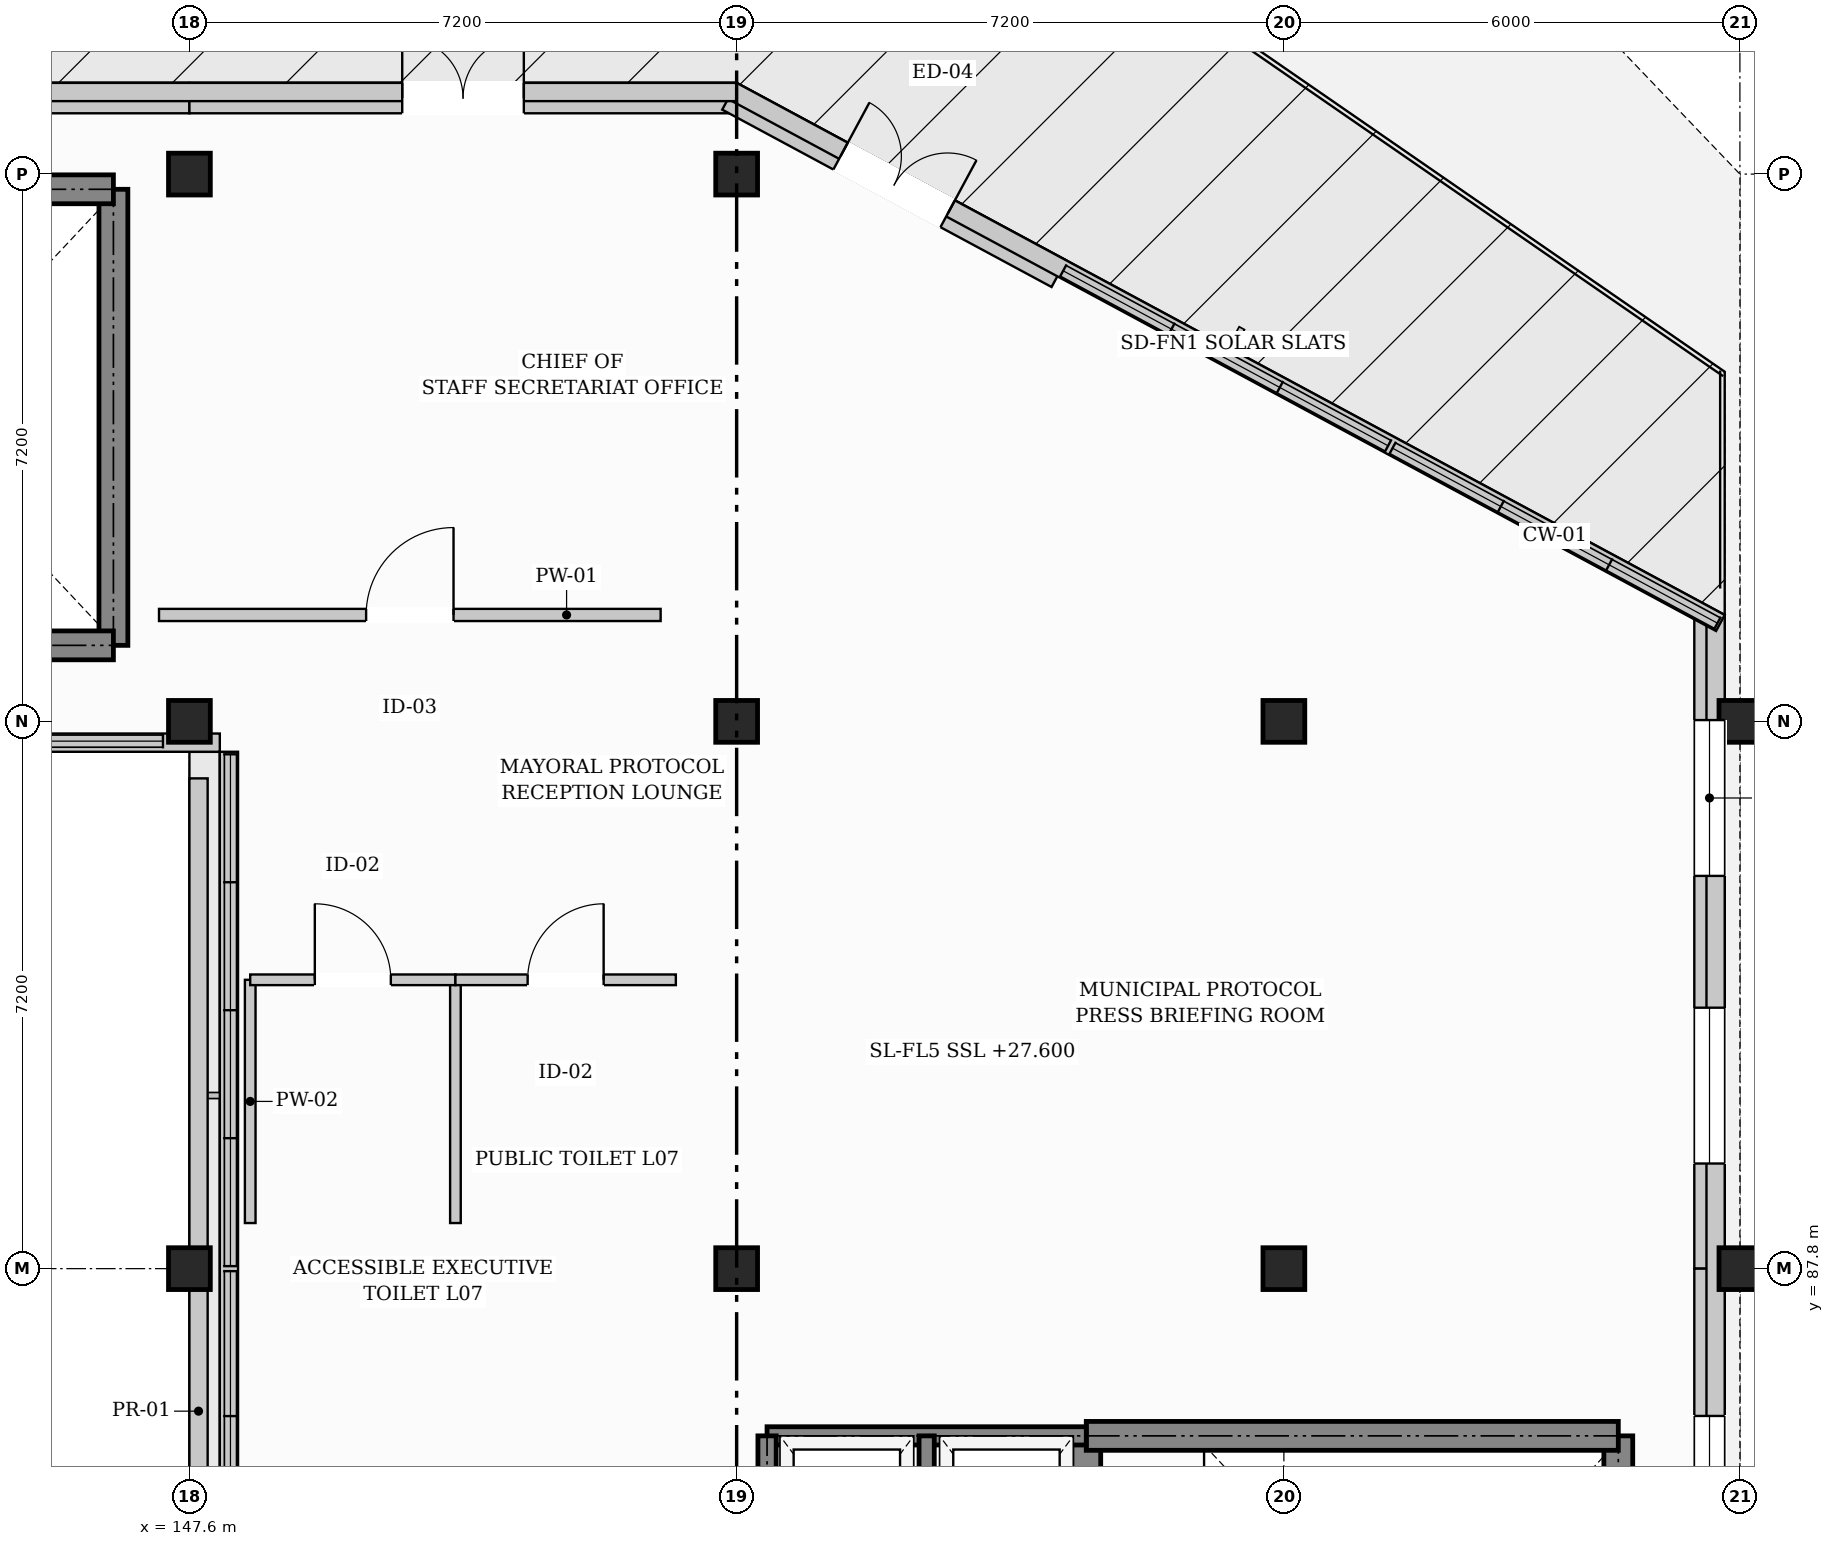
"""IFC4 building model, lengths in metres.
Left out: names, types, materials, properties, quantities, classifications, styles, units other than length and angle.
Written with IfcOpenShell. Run it as: python <this file> out.ifc"""

import sys

from ifc_helpers import new_model, si_unit, direction, frame, frame_2d, origin, origin_2d, place, context, subcontext, project, spatial, rectangle, extrude, element, fill, save


model = new_model("IFC4")
c1 = context("Model", 3, precision=1e-05, world=origin(), true_north=direction((0.0, 1.0)))
c2 = subcontext(c1, "Body", "Model", "MODEL_VIEW")
j1 = project(units=[si_unit("LENGTHUNIT", "METRE"), si_unit("PLANEANGLEUNIT", "RADIAN")], contexts=[c1])
p1 = place(None, origin())
s1 = spatial("IfcSite", under=j1, at=p1, CompositionType="ELEMENT")
p2 = place(p1, origin())
s2 = spatial("IfcBuilding", under=s1, at=p2, CompositionType="ELEMENT")
p3 = place(p2, frame((0.0, 0.0, 27.6)))
s3 = spatial("IfcBuildingStorey", under=s2, at=p3, CompositionType="ELEMENT", Elevation=27.6)
for number, where, z_axis, x_axis in (
    (1, (147.6, 87.8, 0.0), (0.0, 0.0, 1.0), (1.0, 0.0, 0.0)),
    (2, (147.6, 95.0, 0.0), (0.0, 0.0, 1.0), (1.0, 0.0, 0.0)),
    (3, (147.6, 102.2, 0.0), (0.0, 0.0, 1.0), (1.0, 0.0, 0.0)),
    (4, (154.8, 87.8, 0.0), (0.0, 0.0, 1.0), (1.0, 0.0, 0.0)),
    (5, (154.8, 95.0, 0.0), (0.0, 0.0, 1.0), (1.0, 0.0, 0.0)),
    (6, (154.8, 102.2, 0.0), (0.0, 0.0, 1.0), (1.0, 0.0, 0.0)),
    (7, (162.0, 87.8, 0.0), (0.0, 0.0, 1.0), (1.0, 0.0, 0.0)),
    (8, (162.0, 95.0, 0.0), (0.0, 0.0, 1.0), (1.0, 0.0, 0.0)),
    (9, (168.0, 87.8, 0.0), (0.0, 0.0, 1.0), (1.0, 0.0, 0.0)),
    (10, (168.0, 95.0, 0.0), (0.0, 0.0, 1.0), (1.0, 0.0, 0.0)),
):
    element("IfcColumn", number, at=place(p3, frame(where, z_axis=z_axis, x_axis=x_axis)), inside=s3, PredefinedType="COLUMN", context=c2, shape_type="SweptSolid", body=[
        extrude(rectangle(XDim=0.55, YDim=0.55, at=origin_2d()), origin(), (0.0, 0.0, 1.0), 3.6),
    ])
p4 = place(p3, frame((138.6, 103.2, 0.0), z_axis=(0.0, 0.0, 1.0), x_axis=(1.0, 0.0, 0.0)))
e11 = element("IfcWall", 11, at=p4, inside=s3, PredefinedType="SOLIDWALL", context=c2, shape_type="SweptSolid", body=[
    extrude(rectangle(XDim=9.0, YDim=0.4, at=frame_2d((4.5, 0.0))), origin(), (0.0, 0.0, 1.0), 3.34),
])
p5 = place(p4, frame((3.7, 0.0, 0.0)))
e12 = element("IfcOpeningElement", 12, at=p5, cuts=e11, PredefinedType="OPENING", context=c2, shape_type="SweptSolid", body=[
    extrude(rectangle(XDim=1.6, YDim=2.25, at=frame_2d((0.8, 1.125))), frame((0.0, 0.21, 0.0), z_axis=(0.0, -1.0, 0.0), x_axis=(1.0, 0.0, 0.0)), (0.0, 0.0, 1.0), 0.42),
])
p6 = place(p3, frame((147.6, 103.2, 0.0), z_axis=(0.0, 0.0, 1.0), x_axis=(1.0, 0.0, 0.0)))
e13 = element("IfcWall", 13, at=p6, inside=s3, PredefinedType="SOLIDWALL", context=c2, shape_type="SweptSolid", body=[
    extrude(rectangle(XDim=7.2, YDim=0.4, at=frame_2d((3.6, 0.0))), origin(), (0.0, 0.0, 1.0), 3.34),
])
p7 = place(p6, frame((2.8, 0.0, 0.0)))
e14 = element("IfcOpeningElement", 14, at=p7, cuts=e13, PredefinedType="OPENING", context=c2, shape_type="SweptSolid", body=[
    extrude(rectangle(XDim=1.6, YDim=2.25, at=frame_2d((0.8, 1.125))), frame((0.0, 0.21, 0.0), z_axis=(0.0, -1.0, 0.0), x_axis=(1.0, 0.0, 0.0)), (0.0, 0.0, 1.0), 0.42),
])
p8 = place(p3, frame((154.705, 103.224, 0.0), z_axis=(0.0, 0.0, 1.0), x_axis=(0.880485434856, -0.474073200052, 0.0)))
e15 = element("IfcWall", 15, at=p8, inside=s3, PredefinedType="SOLIDWALL", context=c2, shape_type="SweptSolid", body=[
    extrude(rectangle(XDim=4.922, YDim=0.4, at=frame_2d((2.461, 0.0))), origin(), (0.0, 0.0, 1.0), 3.34),
])
p9 = place(p8, frame((1.661, 0.0, 0.0)))
e16 = element("IfcOpeningElement", 16, at=p9, cuts=e15, PredefinedType="OPENING", context=c2, shape_type="SweptSolid", body=[
    extrude(rectangle(XDim=1.6, YDim=2.25, at=frame_2d((0.8, 1.125))), frame((0.0, 0.21, 0.0), z_axis=(0.0, -1.0, 0.0), x_axis=(1.0, 0.0, 0.0)), (0.0, 0.0, 1.0), 0.42),
])
p10 = place(p3, frame((167.6, 96.4, 0.0), z_axis=(0.0, 0.0, 1.0), x_axis=(0.0, -1.0, 0.0)))
e17 = element("IfcWall", 17, at=p10, inside=s3, PredefinedType="SOLIDWALL", context=c2, shape_type="SweptSolid", body=[
    extrude(rectangle(XDim=8.6, YDim=0.4, at=frame_2d((4.3, 0.0))), origin(), (0.0, 0.0, 1.0), 2.69),
])
p11 = place(p10, frame((1.383, 0.0, 0.8)))
e18 = element("IfcOpeningElement", 18, at=p11, cuts=e17, PredefinedType="OPENING", context=c2, shape_type="SweptSolid", body=[
    extrude(rectangle(XDim=2.05, YDim=1.55, at=frame_2d((1.025, 0.775))), frame((0.0, 0.21, 0.0), z_axis=(0.0, -1.0, 0.0), x_axis=(1.0, 0.0, 0.0)), (0.0, 0.0, 1.0), 0.42),
])
p12 = place(p10, frame((5.167, 0.0, 0.8)))
e19 = element("IfcOpeningElement", 19, at=p12, cuts=e17, PredefinedType="OPENING", context=c2, shape_type="SweptSolid", body=[
    extrude(rectangle(XDim=2.05, YDim=1.55, at=frame_2d((1.025, 0.775))), frame((0.0, 0.21, 0.0), z_axis=(0.0, -1.0, 0.0), x_axis=(1.0, 0.0, 0.0)), (0.0, 0.0, 1.0), 0.42),
])
p13 = place(p3, frame((167.6, 87.8, 0.0), z_axis=(0.0, 0.0, 1.0), x_axis=(0.0, -1.0, 0.0)))
e20 = element("IfcWall", 20, at=p13, inside=s3, PredefinedType="SOLIDWALL", context=c2, shape_type="SweptSolid", body=[
    extrude(rectangle(XDim=9.6, YDim=0.4, at=frame_2d((4.8, 0.0))), origin(), (0.0, 0.0, 1.0), 2.72),
])
p14 = place(p13, frame((1.938, 0.0, 0.8)))
e21 = element("IfcOpeningElement", 21, at=p14, cuts=e20, PredefinedType="OPENING", context=c2, shape_type="SweptSolid", body=[
    extrude(rectangle(XDim=1.5, YDim=1.6, at=frame_2d((0.75, 0.8))), frame((0.0, 0.21, 0.0), z_axis=(0.0, -1.0, 0.0), x_axis=(1.0, 0.0, 0.0)), (0.0, 0.0, 1.0), 0.42),
])
p15 = place(p13, frame((6.162, 0.0, 0.8)))
e22 = element("IfcOpeningElement", 22, at=p15, cuts=e20, PredefinedType="OPENING", context=c2, shape_type="SweptSolid", body=[
    extrude(rectangle(XDim=1.5, YDim=1.6, at=frame_2d((0.75, 0.8))), frame((0.0, 0.21, 0.0), z_axis=(0.0, -1.0, 0.0), x_axis=(1.0, 0.0, 0.0)), (0.0, 0.0, 1.0), 0.42),
])
p16 = place(p3, frame((147.72, 77.6, 0.0), z_axis=(0.0, 0.0, 1.0), x_axis=(0.0, 1.0, 0.0)))
e23 = element("IfcWall", 23, at=p16, inside=s3, PredefinedType="PARAPET", context=c2, shape_type="SweptSolid", body=[
    extrude(rectangle(XDim=16.65, YDim=0.24, at=frame_2d((8.325, 0.0))), origin(), (0.0, 0.0, 1.0), 1.15),
])
p17 = place(p3, frame((122.4, 94.72, 3.6), z_axis=(0.0, 0.0, 1.0), x_axis=(1.0, 0.0, 0.0)))
e24 = element("IfcWall", 24, at=p17, inside=s3, PredefinedType="PARAPET", context=c2, shape_type="SweptSolid", body=[
    extrude(rectangle(XDim=25.6, YDim=0.24, at=frame_2d((12.8, 0.0))), origin(), (0.0, 0.0, 1.0), 1.15),
])
p18 = place(p3, frame((148.12, 94.6, 3.6), z_axis=(0.0, 0.0, 1.0), x_axis=(0.0, -1.0, 0.0)))
e25 = element("IfcWall", 25, at=p18, inside=s3, PredefinedType="PARAPET", context=c2, shape_type="SweptSolid", body=[
    extrude(rectangle(XDim=16.4, YDim=0.24, at=frame_2d((8.2, 0.0))), origin(), (0.0, 0.0, 1.0), 1.15),
])
p19 = place(p3, frame((167.68, 78.2, 3.6), z_axis=(0.0, 0.0, 1.0), x_axis=(0.0, 1.0, 0.0)))
e26 = element("IfcWall", 26, at=p19, inside=s3, PredefinedType="PARAPET", context=c2, shape_type="SweptSolid", body=[
    extrude(rectangle(XDim=18.2, YDim=0.24, at=frame_2d((9.1, 0.0))), origin(), (0.0, 0.0, 1.0), 1.15),
])
p20 = place(p3, frame((167.743, 96.294, 3.6), z_axis=(0.0, 0.0, 1.0), x_axis=(-0.880471099922, 0.474099823035, 0.0)))
e27 = element("IfcWall", 27, at=p20, inside=s3, PredefinedType="PARAPET", context=c2, shape_type="SweptSolid", body=[
    extrude(rectangle(XDim=14.765, YDim=0.24, at=frame_2d((7.382, 0.0))), origin(), (0.0, 0.0, 1.0), 1.15),
])
p21 = place(p3, frame((154.8, 103.28, 3.6), z_axis=(0.0, 0.0, 1.0), x_axis=(-1.0, 0.0, 0.0)))
e28 = element("IfcWall", 28, at=p21, inside=s3, PredefinedType="PARAPET", context=c2, shape_type="SweptSolid", body=[
    extrude(rectangle(XDim=32.4, YDim=0.24, at=frame_2d((16.2, 0.0))), origin(), (0.0, 0.0, 1.0), 1.15),
])
p22 = place(p3, frame((146.6, 96.0, 0.0), z_axis=(0.0, 0.0, 1.0), x_axis=(0.0, 1.0, 0.0)))
e29 = element("IfcWall", 29, at=p22, inside=s3, PredefinedType="SHEAR", context=c2, shape_type="SweptSolid", body=[
    extrude(rectangle(XDim=6.0, YDim=0.38, at=frame_2d((3.0, 0.0))), origin(), (0.0, 0.0, 1.0), 3.34),
])
for number, where, z_axis, x_axis in (
    (30, (139.6, 96.0, 0.0), (0.0, 0.0, 1.0), (1.0, 0.0, 0.0)),
    (31, (139.6, 102.0, 0.0), (0.0, 0.0, 1.0), (1.0, 0.0, 0.0)),
):
    element("IfcWall", number, at=place(p3, frame(where, z_axis=z_axis, x_axis=x_axis)), inside=s3, PredefinedType="SHEAR", context=c2, shape_type="SweptSolid", body=[
        extrude(rectangle(XDim=7.0, YDim=0.38, at=frame_2d((3.5, 0.0))), origin(), (0.0, 0.0, 1.0), 3.34),
    ])
p23 = place(p3, frame((159.4, 79.6, 0.0), z_axis=(0.0, 0.0, 1.0), x_axis=(0.0, 1.0, 0.0)))
e32 = element("IfcWall", 32, at=p23, inside=s3, PredefinedType="SHEAR", context=c2, shape_type="SweptSolid", body=[
    extrude(rectangle(XDim=6.0, YDim=0.38, at=frame_2d((3.0, 0.0))), origin(), (0.0, 0.0, 1.0), 3.34),
])
p24 = place(p23, frame((1.275, 0.0, 0.0)))
e33 = element("IfcOpeningElement", 33, at=p24, cuts=e32, PredefinedType="OPENING", context=c2, shape_type="SweptSolid", body=[
    extrude(rectangle(XDim=1.05, YDim=2.15, at=frame_2d((0.525, 1.075))), frame((0.0, 0.2, 0.0), z_axis=(0.0, -1.0, 0.0), x_axis=(1.0, 0.0, 0.0)), (0.0, 0.0, 1.0), 0.4),
])
p25 = place(p3, frame((166.4, 79.6, 0.0), z_axis=(0.0, 0.0, 1.0), x_axis=(0.0, 1.0, 0.0)))
e34 = element("IfcWall", 34, at=p25, inside=s3, PredefinedType="SHEAR", context=c2, shape_type="SweptSolid", body=[
    extrude(rectangle(XDim=6.0, YDim=0.38, at=frame_2d((3.0, 0.0))), origin(), (0.0, 0.0, 1.0), 3.34),
])
p26 = place(p3, frame((159.4, 85.6, 0.0), z_axis=(0.0, 0.0, 1.0), x_axis=(1.0, 0.0, 0.0)))
e35 = element("IfcWall", 35, at=p26, inside=s3, PredefinedType="SHEAR", context=c2, shape_type="SweptSolid", body=[
    extrude(rectangle(XDim=7.0, YDim=0.38, at=frame_2d((3.5, 0.0))), origin(), (0.0, 0.0, 1.0), 3.34),
])
p27 = place(p3, frame((155.2, 85.6, 0.0), z_axis=(0.0, 0.0, 1.0), x_axis=(1.0, 0.0, 0.0)))
e36 = element("IfcWall", 36, at=p27, inside=s3, PredefinedType="SHEAR", context=c2, shape_type="SweptSolid", body=[
    extrude(rectangle(XDim=4.2, YDim=0.24, at=frame_2d((2.1, 0.0))), origin(), (0.0, 0.0, 1.0), 3.34),
])
p28 = place(p3, frame((155.2, 83.25, 0.0), z_axis=(0.0, 0.0, 1.0), x_axis=(0.0, 1.0, 0.0)))
e37 = element("IfcWall", 37, at=p28, inside=s3, PredefinedType="SHEAR", context=c2, shape_type="SweptSolid", body=[
    extrude(rectangle(XDim=2.35, YDim=0.24, at=frame_2d((1.175, 0.0))), origin(), (0.0, 0.0, 1.0), 3.34),
])
p29 = place(p3, frame((157.3, 83.25, 0.0), z_axis=(0.0, 0.0, 1.0), x_axis=(0.0, 1.0, 0.0)))
e38 = element("IfcWall", 38, at=p29, inside=s3, PredefinedType="SHEAR", context=c2, shape_type="SweptSolid", body=[
    extrude(rectangle(XDim=2.35, YDim=0.2, at=frame_2d((1.175, 0.0))), origin(), (0.0, 0.0, 1.0), 3.34),
])
for number, where, z_axis, x_axis in (
    (39, (148.4, 88.4, 0.0), (0.0, 0.0, 1.0), (0.0, 1.0, 0.0)),
    (40, (151.1, 88.4, 0.0), (0.0, 0.0, 1.0), (0.0, 1.0, 0.0)),
):
    element("IfcWall", number, at=place(p3, frame(where, z_axis=z_axis, x_axis=x_axis)), inside=s3, PredefinedType="PARTITIONING", context=c2, shape_type="SweptSolid", body=[
        extrude(rectangle(XDim=3.2, YDim=0.14, at=frame_2d((1.6, 0.0))), origin(), (0.0, 0.0, 1.0), 3.12),
    ])
p30 = place(p3, frame((148.4, 91.6, 0.0), z_axis=(0.0, 0.0, 1.0), x_axis=(1.0, 0.0, 0.0)))
e41 = element("IfcWall", 41, at=p30, inside=s3, PredefinedType="PARTITIONING", context=c2, shape_type="SweptSolid", body=[
    extrude(rectangle(XDim=2.7, YDim=0.14, at=frame_2d((1.35, 0.0))), origin(), (0.0, 0.0, 1.0), 3.12),
])
p31 = place(p30, frame((0.85, 0.0, 0.0)))
e42 = element("IfcOpeningElement", 42, at=p31, cuts=e41, PredefinedType="OPENING", context=c2, shape_type="SweptSolid", body=[
    extrude(rectangle(XDim=1.0, YDim=2.15, at=frame_2d((0.5, 1.075))), frame((0.0, 0.08, 0.0), z_axis=(0.0, -1.0, 0.0), x_axis=(1.0, 0.0, 0.0)), (0.0, 0.0, 1.0), 0.16),
])
p32 = place(p3, frame((151.1, 91.6, 0.0), z_axis=(0.0, 0.0, 1.0), x_axis=(1.0, 0.0, 0.0)))
e43 = element("IfcWall", 43, at=p32, inside=s3, PredefinedType="PARTITIONING", context=c2, shape_type="SweptSolid", body=[
    extrude(rectangle(XDim=2.9, YDim=0.14, at=frame_2d((1.45, 0.0))), origin(), (0.0, 0.0, 1.0), 3.12),
])
p33 = place(p32, frame((0.95, 0.0, 0.0)))
e44 = element("IfcOpeningElement", 44, at=p33, cuts=e43, PredefinedType="OPENING", context=c2, shape_type="SweptSolid", body=[
    extrude(rectangle(XDim=1.0, YDim=2.15, at=frame_2d((0.5, 1.075))), frame((0.0, 0.08, 0.0), z_axis=(0.0, -1.0, 0.0), x_axis=(1.0, 0.0, 0.0)), (0.0, 0.0, 1.0), 0.16),
])
p34 = place(p3, frame((147.2, 96.4, 0.0), z_axis=(0.0, 0.0, 1.0), x_axis=(1.0, 0.0, 0.0)))
e45 = element("IfcWall", 45, at=p34, inside=s3, PredefinedType="PARTITIONING", context=c2, shape_type="SweptSolid", body=[
    extrude(rectangle(XDim=6.6, YDim=0.16, at=frame_2d((3.3, 0.0))), origin(), (0.0, 0.0, 1.0), 2.64),
])
p35 = place(p34, frame((2.725, 0.0, 0.0)))
e46 = element("IfcOpeningElement", 46, at=p35, cuts=e45, PredefinedType="OPENING", context=c2, shape_type="SweptSolid", body=[
    extrude(rectangle(XDim=1.15, YDim=2.2, at=frame_2d((0.575, 1.1))), frame((0.0, 0.09, 0.0), z_axis=(0.0, -1.0, 0.0), x_axis=(1.0, 0.0, 0.0)), (0.0, 0.0, 1.0), 0.18),
])
p36 = place(p7, origin())
e47 = element("IfcDoor", 47, at=p36, inside=s3, OperationType="DOUBLE_DOOR_SINGLE_SWING", PredefinedType="DOOR", context=c2, shape_type="SweptSolid", body=[
    extrude(rectangle(XDim=1.6, YDim=2.25, at=frame_2d((0.8, 1.125))), frame((0.0, 0.025, 0.0), z_axis=(0.0, -1.0, 0.0), x_axis=(1.0, 0.0, 0.0)), (0.0, 0.0, 1.0), 0.05),
])
fill(e14, e47)
p37 = place(p9, origin())
e48 = element("IfcDoor", 48, at=p37, inside=s3, OperationType="DOUBLE_DOOR_SINGLE_SWING", PredefinedType="DOOR", context=c2, shape_type="SweptSolid", body=[
    extrude(rectangle(XDim=1.6, YDim=2.25, at=frame_2d((0.8, 1.125))), frame((0.0, 0.025, 0.0), z_axis=(0.0, -1.0, 0.0), x_axis=(1.0, 0.0, 0.0)), (0.0, 0.0, 1.0), 0.05),
])
fill(e16, e48)
p38 = place(p11, origin())
e49 = element("IfcWindow", 49, at=p38, inside=s3, PartitioningType="DOUBLE_PANEL_VERTICAL", PredefinedType="WINDOW", context=c2, shape_type="SweptSolid", body=[
    extrude(rectangle(XDim=2.05, YDim=1.55, at=frame_2d((1.025, 0.775))), frame((0.0, 0.03, 0.0), z_axis=(0.0, -1.0, 0.0), x_axis=(1.0, 0.0, 0.0)), (0.0, 0.0, 1.0), 0.06),
])
fill(e18, e49)
p39 = place(p12, origin())
e50 = element("IfcWindow", 50, at=p39, inside=s3, PartitioningType="DOUBLE_PANEL_VERTICAL", PredefinedType="WINDOW", context=c2, shape_type="SweptSolid", body=[
    extrude(rectangle(XDim=2.05, YDim=1.55, at=frame_2d((1.025, 0.775))), frame((0.0, 0.03, 0.0), z_axis=(0.0, -1.0, 0.0), x_axis=(1.0, 0.0, 0.0)), (0.0, 0.0, 1.0), 0.06),
])
fill(e19, e50)
p40 = place(p14, origin())
e51 = element("IfcWindow", 51, at=p40, inside=s3, PartitioningType="DOUBLE_PANEL_HORIZONTAL", PredefinedType="WINDOW", context=c2, shape_type="SweptSolid", body=[
    extrude(rectangle(XDim=1.5, YDim=1.6, at=frame_2d((0.75, 0.8))), frame((0.0, 0.03, 0.0), z_axis=(0.0, -1.0, 0.0), x_axis=(1.0, 0.0, 0.0)), (0.0, 0.0, 1.0), 0.06),
])
fill(e21, e51)
p41 = place(p31, origin())
e52 = element("IfcDoor", 52, at=p41, inside=s3, OperationType="SINGLE_SWING_LEFT", PredefinedType="DOOR", context=c2, shape_type="SweptSolid", body=[
    extrude(rectangle(XDim=1.0, YDim=2.15, at=frame_2d((0.5, 1.075))), frame((0.0, 0.025, 0.0), z_axis=(0.0, -1.0, 0.0), x_axis=(1.0, 0.0, 0.0)), (0.0, 0.0, 1.0), 0.05),
])
fill(e42, e52)
p42 = place(p33, origin())
e53 = element("IfcDoor", 53, at=p42, inside=s3, OperationType="SINGLE_SWING_RIGHT", PredefinedType="DOOR", context=c2, shape_type="SweptSolid", body=[
    extrude(rectangle(XDim=1.0, YDim=2.15, at=frame_2d((0.5, 1.075))), frame((0.0, 0.025, 0.0), z_axis=(0.0, -1.0, 0.0), x_axis=(1.0, 0.0, 0.0)), (0.0, 0.0, 1.0), 0.05),
])
fill(e44, e53)
p43 = place(p35, origin())
e54 = element("IfcDoor", 54, at=p43, inside=s3, OperationType="SINGLE_SWING_RIGHT", PredefinedType="DOOR", context=c2, shape_type="SweptSolid", body=[
    extrude(rectangle(XDim=1.15, YDim=2.2, at=frame_2d((0.575, 1.1))), frame((0.0, 0.025, 0.0), z_axis=(0.0, -1.0, 0.0), x_axis=(1.0, 0.0, 0.0)), (0.0, 0.0, 1.0), 0.05),
])
fill(e46, e54)
save(model, sys.argv[1])
